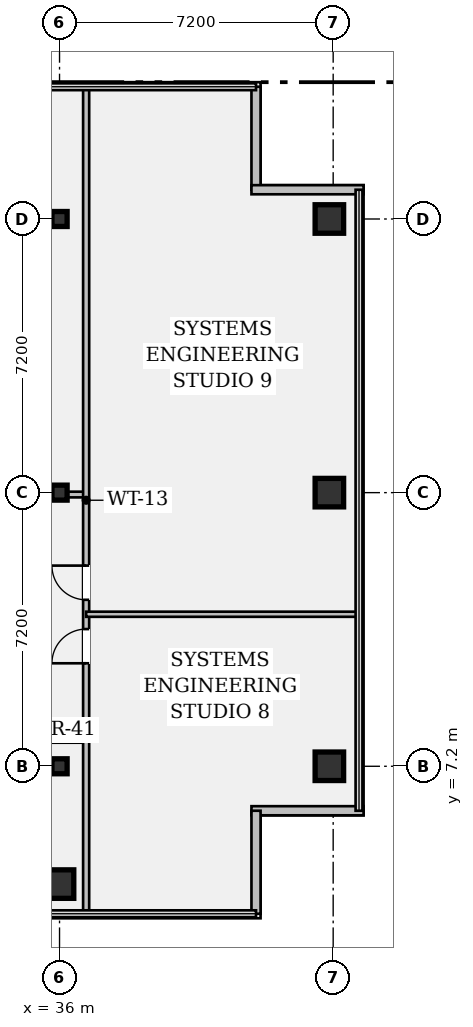
"""IFC4 building model, lengths in metres.
Left out: names, types, materials, properties, quantities, classifications, styles, units other than length and angle.
Written with IfcOpenShell. Run it as: python <this file> out.ifc"""

import sys

from ifc_helpers import new_model, si_unit, direction, frame, frame_2d, origin, origin_2d, place, context, subcontext, project, spatial, rectangle, hollow_rectangle, i_section, extrude, element, fill, save


model = new_model("IFC4")
c1 = context("Model", 3, precision=1e-05, world=origin(), true_north=direction((0.0, 1.0)))
c2 = subcontext(c1, "Body", "Model", "MODEL_VIEW")
j1 = project(units=[si_unit("LENGTHUNIT", "METRE"), si_unit("PLANEANGLEUNIT", "RADIAN")], contexts=[c1])
p1 = place(None, origin())
s1 = spatial("IfcSite", under=j1, at=p1, CompositionType="ELEMENT")
p2 = place(p1, origin())
s2 = spatial("IfcBuilding", under=s1, at=p2, CompositionType="ELEMENT")
p3 = place(p2, frame((0.0, 0.0, 225.75)))
s3 = spatial("IfcBuildingStorey", under=s2, at=p3, CompositionType="ELEMENT", Elevation=225.75)
p4 = place(p3, frame((36.0, 4.1, 0.0), z_axis=(0.0, 0.0, 1.0), x_axis=(1.0, 0.0, 0.0)))
e1 = element("IfcColumn", 1, at=p4, inside=s3, PredefinedType="COLUMN", context=c2, shape_type="SweptSolid", body=[
    extrude(hollow_rectangle(XDim=0.75, YDim=0.75, WallThickness=0.045, at=origin_2d()), origin(), (0.0, 0.0, 1.0), 3.24),
])
for number, where, z_axis, x_axis in (
    (2, (36.0, 7.2, 0.0), (0.0, 0.0, 1.0), (1.0, 0.0, 0.0)),
    (3, (36.0, 14.4, 0.0), (0.0, 0.0, 1.0), (1.0, 0.0, 0.0)),
    (4, (36.0, 21.6, 0.0), (0.0, 0.0, 1.0), (1.0, 0.0, 0.0)),
):
    element("IfcColumn", number, at=place(p3, frame(where, z_axis=z_axis, x_axis=x_axis)), inside=s3, PredefinedType="COLUMN", context=c2, shape_type="SweptSolid", body=[
        extrude(i_section(OverallWidth=0.399, OverallDepth=0.394, WebThickness=0.023, FlangeThickness=0.037, FilletRadius=0.018, at=origin_2d()), origin(), (0.0, 0.0, 1.0), 3.24),
    ])
for number, where, z_axis, x_axis in (
    (5, (43.1, 7.2, 0.0), (0.0, 0.0, 1.0), (1.0, 0.0, 0.0)),
    (6, (43.1, 14.4, 0.0), (0.0, 0.0, 1.0), (1.0, 0.0, 0.0)),
    (7, (43.1, 21.6, 0.0), (0.0, 0.0, 1.0), (1.0, 0.0, 0.0)),
):
    element("IfcColumn", number, at=place(p3, frame(where, z_axis=z_axis, x_axis=x_axis)), inside=s3, PredefinedType="COLUMN", context=c2, shape_type="SweptSolid", body=[
        extrude(hollow_rectangle(XDim=0.75, YDim=0.75, WallThickness=0.045, at=origin_2d()), origin(), (0.0, 0.0, 1.0), 3.24),
    ])
p5 = place(p3, frame((41.17, 25.08, 0.0), z_axis=(0.0, 0.0, 1.0), x_axis=(0.0, -1.0, 0.0)))
e8 = element("IfcWall", 8, at=p5, inside=s3, PredefinedType="STANDARD", context=c2, shape_type="SweptSolid", body=[
    extrude(rectangle(XDim=2.71, YDim=0.24, at=frame_2d((1.355, 0.0))), origin(), (0.0, 0.0, 1.0), 3.24),
])
for number, where, z_axis, x_axis in (
    (9, (41.05, 22.37, 0.0), (0.0, 0.0, 1.0), (1.0, 0.0, 0.0)),
    (10, (44.0, 6.03, 0.0), (0.0, 0.0, 1.0), (-1.0, 0.0, 0.0)),
):
    element("IfcWall", number, at=place(p3, frame(where, z_axis=z_axis, x_axis=x_axis)), inside=s3, PredefinedType="STANDARD", context=c2, shape_type="SweptSolid", body=[
        extrude(rectangle(XDim=2.95, YDim=0.24, at=frame_2d((1.475, 0.0))), origin(), (0.0, 0.0, 1.0), 3.24),
    ])
p6 = place(p3, frame((41.17, 6.03, 0.0), z_axis=(0.0, 0.0, 1.0), x_axis=(0.0, -1.0, 0.0)))
e11 = element("IfcWall", 11, at=p6, inside=s3, PredefinedType="STANDARD", context=c2, shape_type="SweptSolid", body=[
    extrude(rectangle(XDim=2.71, YDim=0.24, at=frame_2d((1.355, 0.0))), origin(), (0.0, 0.0, 1.0), 3.24),
])
p7 = place(p3, frame((34.75, 7.9, 0.0), z_axis=(0.0, 0.0, 1.0), x_axis=(1.0, 0.0, 0.0)))
e12 = element("IfcWall", 12, at=p7, inside=s3, PredefinedType="PARTITIONING", context=c2, shape_type="SweptSolid", body=[
    extrude(rectangle(XDim=1.95, YDim=0.16, at=frame_2d((0.975, 0.0))), origin(), (0.0, 0.0, 1.0), 2.613),
])
p8 = place(p3, frame((34.75, 14.35, 0.0), z_axis=(0.0, 0.0, 1.0), x_axis=(1.0, 0.0, 0.0)))
e13 = element("IfcWall", 13, at=p8, inside=s3, PredefinedType="PARTITIONING", context=c2, shape_type="SweptSolid", body=[
    extrude(rectangle(XDim=1.95, YDim=0.15, at=frame_2d((0.975, 0.0))), origin(), (0.0, 0.0, 1.0), 2.613),
])
p9 = place(p3, frame((36.7, 3.32, 0.0), z_axis=(0.0, 0.0, 1.0), x_axis=(0.0, 1.0, 0.0)))
e14 = element("IfcWall", 14, at=p9, inside=s3, PredefinedType="PARTITIONING", context=c2, shape_type="SweptSolid", body=[
    extrude(rectangle(XDim=21.76, YDim=0.16, at=frame_2d((10.88, 0.0))), origin(), (0.0, 0.0, 1.0), 2.613),
])
p10 = place(p9, frame((6.59, 0.0, 0.0)))
e15 = element("IfcOpeningElement", 15, at=p10, cuts=e14, PredefinedType="OPENING", context=c2, shape_type="SweptSolid", body=[
    extrude(rectangle(XDim=0.9, YDim=2.15, at=frame_2d((0.45, 1.075))), frame((0.0, 0.092, 0.0), z_axis=(0.0, -1.0, 0.0), x_axis=(1.0, 0.0, 0.0)), (0.0, 0.0, 1.0), 0.184),
])
p11 = place(p9, frame((8.26, 0.0, 0.0)))
e16 = element("IfcOpeningElement", 16, at=p11, cuts=e14, PredefinedType="OPENING", context=c2, shape_type="SweptSolid", body=[
    extrude(rectangle(XDim=0.9, YDim=2.15, at=frame_2d((0.45, 1.075))), frame((0.0, 0.092, 0.0), z_axis=(0.0, -1.0, 0.0), x_axis=(1.0, 0.0, 0.0)), (0.0, 0.0, 1.0), 0.184),
])
p12 = place(p3, frame((36.7, 11.2, 0.0), z_axis=(0.0, 0.0, 1.0), x_axis=(1.0, 0.0, 0.0)))
e17 = element("IfcWall", 17, at=p12, inside=s3, PredefinedType="PARTITIONING", context=c2, shape_type="SweptSolid", body=[
    extrude(rectangle(XDim=7.18, YDim=0.135, at=frame_2d((3.59, 0.0))), origin(), (0.0, 0.0, 1.0), 2.808),
])
p13 = place(p10, origin())
e18 = element("IfcDoor", 18, at=p13, inside=s3, OperationType="SINGLE_SWING_LEFT", PredefinedType="DOOR", context=c2, shape_type="SweptSolid", body=[
    extrude(rectangle(XDim=0.9, YDim=2.15, at=frame_2d((0.45, 1.075))), frame((0.0, 0.025, 0.0), z_axis=(0.0, -1.0, 0.0), x_axis=(1.0, 0.0, 0.0)), (0.0, 0.0, 1.0), 0.05),
])
fill(e15, e18)
p14 = place(p11, origin())
e19 = element("IfcDoor", 19, at=p14, inside=s3, OperationType="SINGLE_SWING_RIGHT", PredefinedType="DOOR", context=c2, shape_type="SweptSolid", body=[
    extrude(rectangle(XDim=0.9, YDim=2.15, at=frame_2d((0.45, 1.075))), frame((0.0, 0.025, 0.0), z_axis=(0.0, -1.0, 0.0), x_axis=(1.0, 0.0, 0.0)), (0.0, 0.0, 1.0), 0.05),
])
fill(e16, e19)
save(model, sys.argv[1])
